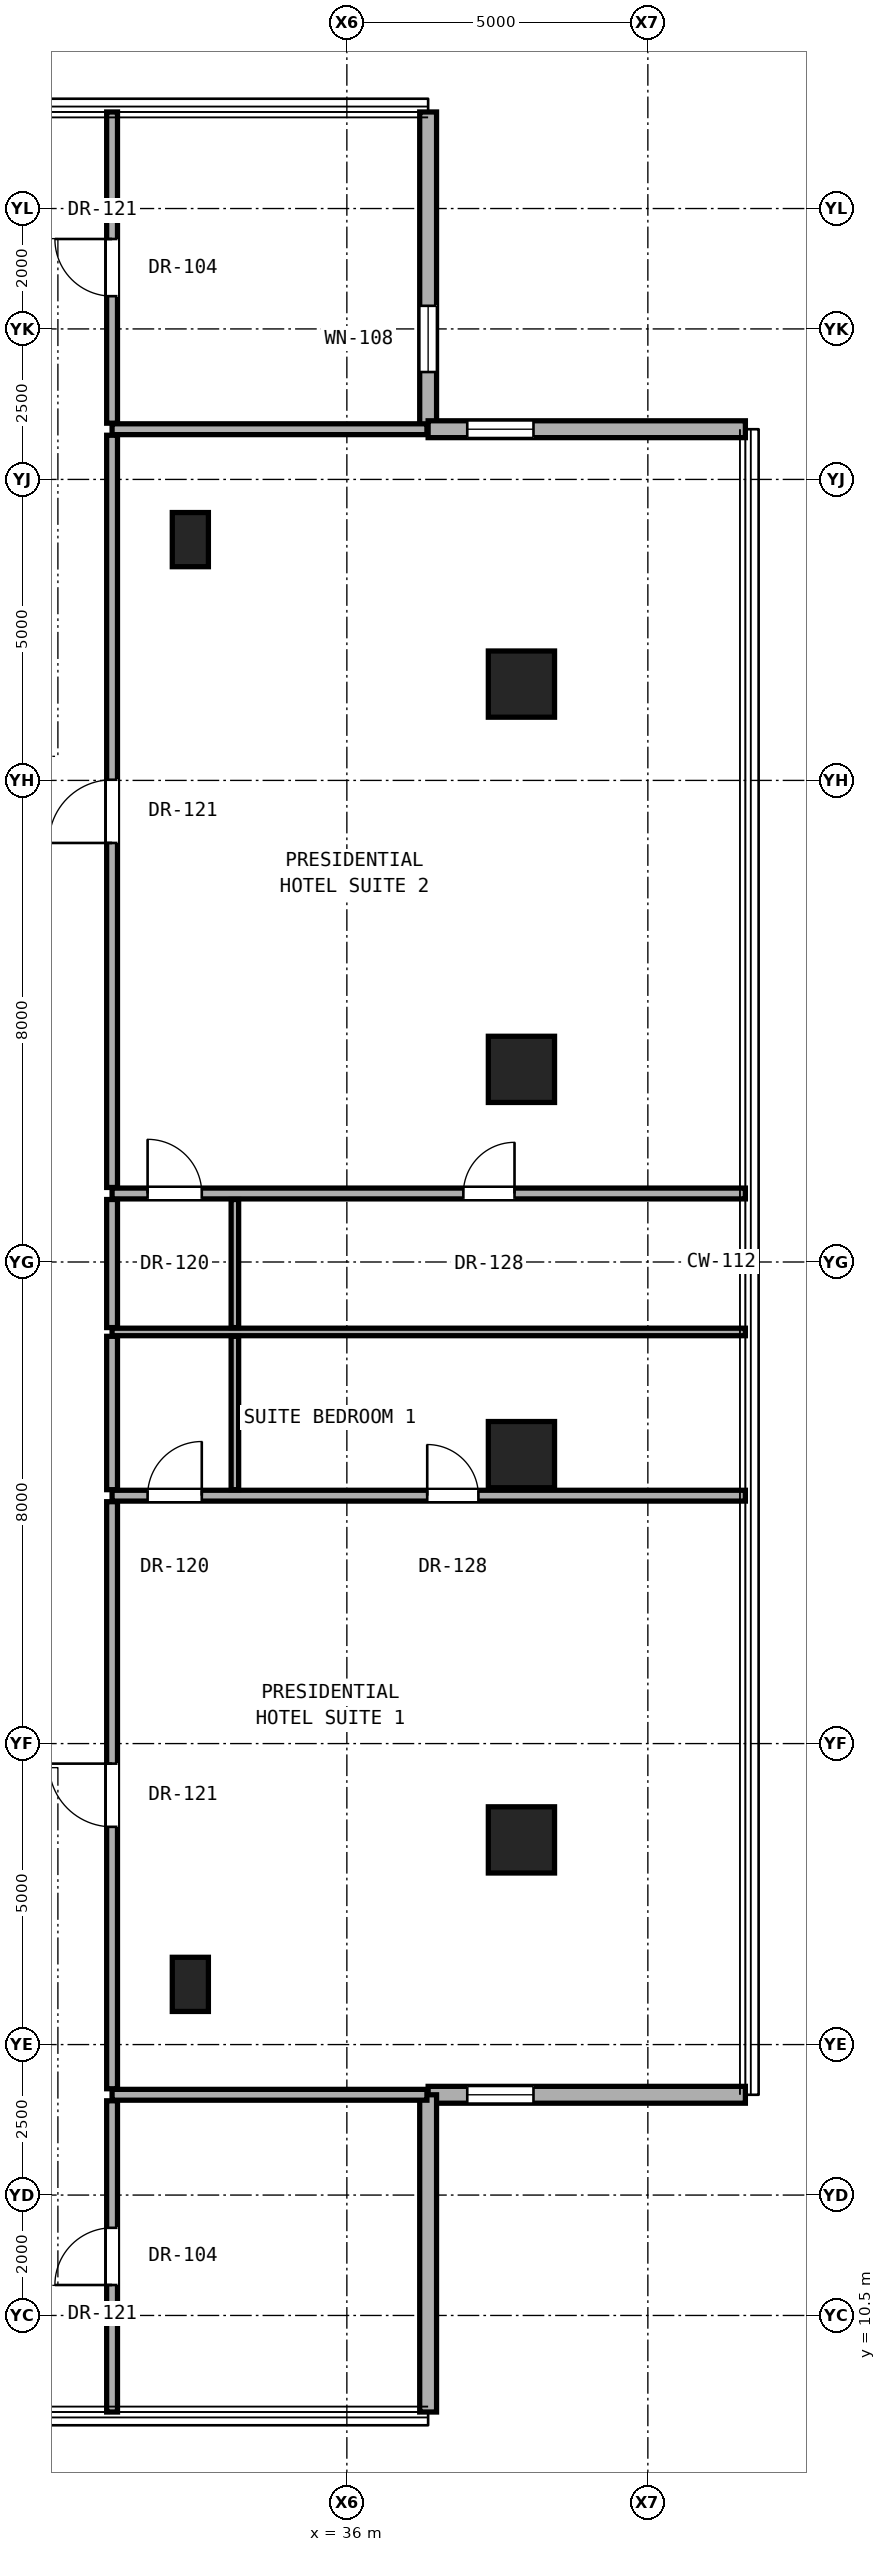
"""IFC4 building model, lengths in metres.
Left out: names, types, materials, properties, quantities, classifications, styles, units other than length and angle.
Written with IfcOpenShell. Run it as: python <this file> out.ifc"""

import sys

from ifc_helpers import new_model, si_unit, direction, frame, frame_2d, origin, origin_2d, place, context, subcontext, project, spatial, rectangle, hollow_rectangle, extrude, element, fill, save


model = new_model("IFC4")
c1 = context("Model", 3, precision=1e-05, world=origin(), true_north=direction((0.0, 1.0)))
c2 = subcontext(c1, "Body", "Model", "MODEL_VIEW")
j1 = project(units=[si_unit("LENGTHUNIT", "METRE"), si_unit("PLANEANGLEUNIT", "RADIAN")], contexts=[c1])
p1 = place(None, origin())
s1 = spatial("IfcSite", under=j1, at=p1, CompositionType="ELEMENT")
p2 = place(p1, origin())
s2 = spatial("IfcBuilding", under=s1, at=p2, CompositionType="ELEMENT")
p3 = place(p2, frame((0.0, 0.0, 144.5)))
s3 = spatial("IfcBuildingStorey", under=s2, at=p3, CompositionType="ELEMENT", Elevation=144.5)
for number, where, z_axis, x_axis in (
    (1, (38.9, 18.4, 0.0), (0.0, 0.0, 1.0), (1.0, 0.0, 0.0)),
    (2, (38.9, 24.8, 0.0), (0.0, 0.0, 1.0), (1.0, 0.0, 0.0)),
    (3, (38.9, 31.2, 0.0), (0.0, 0.0, 1.0), (1.0, 0.0, 0.0)),
    (4, (38.9, 37.6, 0.0), (0.0, 0.0, 1.0), (1.0, 0.0, 0.0)),
):
    element("IfcColumn", number, at=place(p3, frame(where, z_axis=z_axis, x_axis=x_axis)), inside=s3, PredefinedType="COLUMN", context=c2, shape_type="SweptSolid", body=[
        extrude(hollow_rectangle(XDim=1.1, YDim=1.1, WallThickness=0.06, at=origin_2d()), origin(), (0.0, 0.0, 1.0), 3.3),
    ])
for number, where, z_axis, x_axis in (
    (5, (33.4, 16.0, 0.0), (0.0, 0.0, 1.0), (1.0, 0.0, 0.0)),
    (6, (33.4, 40.0, 0.0), (0.0, 0.0, 1.0), (1.0, 0.0, 0.0)),
):
    element("IfcColumn", number, at=place(p3, frame(where, z_axis=z_axis, x_axis=x_axis)), inside=s3, PredefinedType="PILASTER", context=c2, shape_type="SweptSolid", body=[
        extrude(rectangle(XDim=0.6, YDim=0.9, at=origin_2d()), origin(), (0.0, 0.0, 1.0), 3.3),
    ])
p4 = place(p3, frame((37.35, 41.834, 0.0), z_axis=(0.0, 0.0, 1.0), x_axis=(0.0, 1.0, 0.0)))
e7 = element("IfcWall", 7, at=p4, inside=s3, PredefinedType="SOLIDWALL", context=c2, shape_type="SweptSolid", body=[
    extrude(rectangle(XDim=5.27, YDim=0.28, at=frame_2d((2.635, 0.0))), origin(), (0.0, 0.0, 1.0), 2.56),
])
p5 = place(p4, frame((0.95, 0.0, 0.41)))
e8 = element("IfcOpeningElement", 8, at=p5, cuts=e7, PredefinedType="OPENING", context=c2, shape_type="SweptSolid", body=[
    extrude(rectangle(XDim=1.1, YDim=2.0, at=frame_2d((0.55, 1.0))), frame((0.0, 0.15, 0.0), z_axis=(0.0, -1.0, 0.0), x_axis=(1.0, 0.0, 0.0)), (0.0, 0.0, 1.0), 0.3),
])
p6 = place(p3, frame((37.35, 14.166, 0.0), z_axis=(0.0, 0.0, 1.0), x_axis=(1.0, 0.0, 0.0)))
e9 = element("IfcWall", 9, at=p6, inside=s3, PredefinedType="SOLIDWALL", context=c2, shape_type="SweptSolid", body=[
    extrude(rectangle(XDim=5.27, YDim=0.28, at=frame_2d((2.635, 0.0))), origin(), (0.0, 0.0, 1.0), 2.56),
])
p7 = place(p6, frame((0.65, 0.0, 0.41)))
e10 = element("IfcOpeningElement", 10, at=p7, cuts=e9, PredefinedType="OPENING", context=c2, shape_type="SweptSolid", body=[
    extrude(rectangle(XDim=1.1, YDim=2.0, at=frame_2d((0.55, 1.0))), frame((0.0, 0.15, 0.0), z_axis=(0.0, -1.0, 0.0), x_axis=(1.0, 0.0, 0.0)), (0.0, 0.0, 1.0), 0.3),
])
p8 = place(p3, frame((37.35, 8.896, 0.0), z_axis=(0.0, 0.0, 1.0), x_axis=(0.0, 1.0, 0.0)))
e11 = element("IfcWall", 11, at=p8, inside=s3, PredefinedType="SOLIDWALL", context=c2, shape_type="SweptSolid", body=[
    extrude(rectangle(XDim=5.27, YDim=0.28, at=frame_2d((2.635, 0.0))), origin(), (0.0, 0.0, 1.0), 2.56),
])
p9 = place(p3, frame((42.62, 41.834, 0.0), z_axis=(0.0, 0.0, 1.0), x_axis=(-1.0, 0.0, 0.0)))
e12 = element("IfcWall", 12, at=p9, inside=s3, PredefinedType="SOLIDWALL", context=c2, shape_type="SweptSolid", body=[
    extrude(rectangle(XDim=5.27, YDim=0.28, at=frame_2d((2.635, 0.0))), origin(), (0.0, 0.0, 1.0), 2.56),
])
p10 = place(p9, frame((3.52, 0.0, 0.41)))
e13 = element("IfcOpeningElement", 13, at=p10, cuts=e12, PredefinedType="OPENING", context=c2, shape_type="SweptSolid", body=[
    extrude(rectangle(XDim=1.1, YDim=2.0, at=frame_2d((0.55, 1.0))), frame((0.0, 0.15, 0.0), z_axis=(0.0, -1.0, 0.0), x_axis=(1.0, 0.0, 0.0)), (0.0, 0.0, 1.0), 0.3),
])
p11 = place(p3, frame((32.1, 14.166, 0.0), z_axis=(0.0, 0.0, 1.0), x_axis=(1.0, 0.0, 0.0)))
e14 = element("IfcWall", 14, at=p11, inside=s3, PredefinedType="PARTITIONING", context=c2, shape_type="SweptSolid", body=[
    extrude(rectangle(XDim=5.23, YDim=0.18, at=frame_2d((2.615, 0.0))), origin(), (0.0, 0.0, 1.0), 2.94),
])
p12 = place(p3, frame((32.1, 24.118, 0.0), z_axis=(0.0, 0.0, 1.0), x_axis=(1.0, 0.0, 0.0)))
e15 = element("IfcWall", 15, at=p12, inside=s3, PredefinedType="PARTITIONING", context=c2, shape_type="SweptSolid", body=[
    extrude(rectangle(XDim=10.52, YDim=0.18, at=frame_2d((5.26, 0.0))), origin(), (0.0, 0.0, 1.0), 2.159),
])
p13 = place(p12, frame((5.235, 0.0, 0.0)))
e16 = element("IfcOpeningElement", 16, at=p13, cuts=e15, PredefinedType="OPENING", context=c2, shape_type="SweptSolid", body=[
    extrude(rectangle(XDim=0.85, YDim=2.01, at=frame_2d((0.425, 1.005))), frame((0.0, 0.1, 0.0), z_axis=(0.0, -1.0, 0.0), x_axis=(1.0, 0.0, 0.0)), (0.0, 0.0, 1.0), 0.2),
])
p14 = place(p12, frame((0.59, 0.0, 0.0)))
e17 = element("IfcOpeningElement", 17, at=p14, cuts=e15, PredefinedType="OPENING", context=c2, shape_type="SweptSolid", body=[
    extrude(rectangle(XDim=0.9, YDim=2.1, at=frame_2d((0.45, 1.05))), frame((0.0, 0.1, 0.0), z_axis=(0.0, -1.0, 0.0), x_axis=(1.0, 0.0, 0.0)), (0.0, 0.0, 1.0), 0.2),
])
p15 = place(p3, frame((32.1, 26.838, 0.0), z_axis=(0.0, 0.0, 1.0), x_axis=(1.0, 0.0, 0.0)))
e18 = element("IfcWall", 18, at=p15, inside=s3, PredefinedType="PARTITIONING", context=c2, shape_type="SweptSolid", body=[
    extrude(rectangle(XDim=10.52, YDim=0.125, at=frame_2d((5.26, 0.0))), origin(), (0.0, 0.0, 1.0), 2.159),
])
p16 = place(p3, frame((32.1, 29.138, 0.0), z_axis=(0.0, 0.0, 1.0), x_axis=(1.0, 0.0, 0.0)))
e19 = element("IfcWall", 19, at=p16, inside=s3, PredefinedType="PARTITIONING", context=c2, shape_type="SweptSolid", body=[
    extrude(rectangle(XDim=10.52, YDim=0.18, at=frame_2d((5.26, 0.0))), origin(), (0.0, 0.0, 1.0), 2.159),
])
p17 = place(p16, frame((5.835, 0.0, 0.0)))
e20 = element("IfcOpeningElement", 20, at=p17, cuts=e19, PredefinedType="OPENING", context=c2, shape_type="SweptSolid", body=[
    extrude(rectangle(XDim=0.85, YDim=2.01, at=frame_2d((0.425, 1.005))), frame((0.0, 0.1, 0.0), z_axis=(0.0, -1.0, 0.0), x_axis=(1.0, 0.0, 0.0)), (0.0, 0.0, 1.0), 0.2),
])
p18 = place(p16, frame((0.59, 0.0, 0.0)))
e21 = element("IfcOpeningElement", 21, at=p18, cuts=e19, PredefinedType="OPENING", context=c2, shape_type="SweptSolid", body=[
    extrude(rectangle(XDim=0.9, YDim=2.1, at=frame_2d((0.45, 1.05))), frame((0.0, 0.1, 0.0), z_axis=(0.0, -1.0, 0.0), x_axis=(1.0, 0.0, 0.0)), (0.0, 0.0, 1.0), 0.2),
])
p19 = place(p3, frame((32.1, 41.834, 0.0), z_axis=(0.0, 0.0, 1.0), x_axis=(1.0, 0.0, 0.0)))
e22 = element("IfcWall", 22, at=p19, inside=s3, PredefinedType="PARTITIONING", context=c2, shape_type="SweptSolid", body=[
    extrude(rectangle(XDim=5.23, YDim=0.18, at=frame_2d((2.615, 0.0))), origin(), (0.0, 0.0, 1.0), 2.94),
])
p20 = place(p3, frame((32.1, 8.896, 0.0), z_axis=(0.0, 0.0, 1.0), x_axis=(0.0, 1.0, 0.0)))
e23 = element("IfcWall", 23, at=p20, inside=s3, PredefinedType="PARTITIONING", context=c2, shape_type="SweptSolid", body=[
    extrude(rectangle(XDim=5.17, YDim=0.18, at=frame_2d((2.585, 0.0))), origin(), (0.0, 0.0, 1.0), 2.94),
])
p21 = place(p20, frame((2.11, 0.0, 0.0)))
e24 = element("IfcOpeningElement", 24, at=p21, cuts=e23, PredefinedType="OPENING", context=c2, shape_type="SweptSolid", body=[
    extrude(rectangle(XDim=0.95, YDim=2.15, at=frame_2d((0.475, 1.075))), frame((0.0, 0.1, 0.0), z_axis=(0.0, -1.0, 0.0), x_axis=(1.0, 0.0, 0.0)), (0.0, 0.0, 1.0), 0.2),
])
p22 = place(p3, frame((32.1, 14.266, 0.0), z_axis=(0.0, 0.0, 1.0), x_axis=(0.0, 1.0, 0.0)))
e25 = element("IfcWall", 25, at=p22, inside=s3, PredefinedType="PARTITIONING", context=c2, shape_type="SweptSolid", body=[
    extrude(rectangle(XDim=9.752, YDim=0.18, at=frame_2d((4.876, 0.0))), origin(), (0.0, 0.0, 1.0), 2.316),
])
p23 = place(p22, frame((4.351, 0.0, 0.0)))
e26 = element("IfcOpeningElement", 26, at=p23, cuts=e25, PredefinedType="OPENING", context=c2, shape_type="SweptSolid", body=[
    extrude(rectangle(XDim=1.05, YDim=2.2, at=frame_2d((0.525, 1.1))), frame((0.0, 0.1, 0.0), z_axis=(0.0, -1.0, 0.0), x_axis=(1.0, 0.0, 0.0)), (0.0, 0.0, 1.0), 0.2),
])
p24 = place(p3, frame((32.1, 24.218, 0.0), z_axis=(0.0, 0.0, 1.0), x_axis=(0.0, 1.0, 0.0)))
e27 = element("IfcWall", 27, at=p24, inside=s3, PredefinedType="PARTITIONING", context=c2, shape_type="SweptSolid", body=[
    extrude(rectangle(XDim=2.547, YDim=0.18, at=frame_2d((1.274, 0.0))), origin(), (0.0, 0.0, 1.0), 2.316),
])
p25 = place(p3, frame((32.1, 26.91, 0.0), z_axis=(0.0, 0.0, 1.0), x_axis=(0.0, 1.0, 0.0)))
e28 = element("IfcWall", 28, at=p25, inside=s3, PredefinedType="PARTITIONING", context=c2, shape_type="SweptSolid", body=[
    extrude(rectangle(XDim=2.128, YDim=0.18, at=frame_2d((1.064, 0.0))), origin(), (0.0, 0.0, 1.0), 2.94),
])
p26 = place(p3, frame((32.1, 29.238, 0.0), z_axis=(0.0, 0.0, 1.0), x_axis=(0.0, 1.0, 0.0)))
e29 = element("IfcWall", 29, at=p26, inside=s3, PredefinedType="PARTITIONING", context=c2, shape_type="SweptSolid", body=[
    extrude(rectangle(XDim=12.496, YDim=0.18, at=frame_2d((6.248, 0.0))), origin(), (0.0, 0.0, 1.0), 2.316),
])
p27 = place(p26, frame((5.723, 0.0, 0.0)))
e30 = element("IfcOpeningElement", 30, at=p27, cuts=e29, PredefinedType="OPENING", context=c2, shape_type="SweptSolid", body=[
    extrude(rectangle(XDim=1.05, YDim=2.2, at=frame_2d((0.525, 1.1))), frame((0.0, 0.1, 0.0), z_axis=(0.0, -1.0, 0.0), x_axis=(1.0, 0.0, 0.0)), (0.0, 0.0, 1.0), 0.2),
])
p28 = place(p3, frame((32.1, 41.934, 0.0), z_axis=(0.0, 0.0, 1.0), x_axis=(0.0, 1.0, 0.0)))
e31 = element("IfcWall", 31, at=p28, inside=s3, PredefinedType="PARTITIONING", context=c2, shape_type="SweptSolid", body=[
    extrude(rectangle(XDim=5.17, YDim=0.18, at=frame_2d((2.585, 0.0))), origin(), (0.0, 0.0, 1.0), 2.94),
])
p29 = place(p28, frame((2.11, 0.0, 0.0)))
e32 = element("IfcOpeningElement", 32, at=p29, cuts=e31, PredefinedType="OPENING", context=c2, shape_type="SweptSolid", body=[
    extrude(rectangle(XDim=0.95, YDim=2.15, at=frame_2d((0.475, 1.075))), frame((0.0, 0.1, 0.0), z_axis=(0.0, -1.0, 0.0), x_axis=(1.0, 0.0, 0.0)), (0.0, 0.0, 1.0), 0.2),
])
p30 = place(p3, frame((34.14, 24.218, 0.0), z_axis=(0.0, 0.0, 1.0), x_axis=(0.0, 1.0, 0.0)))
e33 = element("IfcWall", 33, at=p30, inside=s3, PredefinedType="PARTITIONING", context=c2, shape_type="SweptSolid", body=[
    extrude(rectangle(XDim=2.547, YDim=0.125, at=frame_2d((1.274, 0.0))), origin(), (0.0, 0.0, 1.0), 2.316),
])
p31 = place(p3, frame((34.14, 26.91, 0.0), z_axis=(0.0, 0.0, 1.0), x_axis=(0.0, 1.0, 0.0)))
e34 = element("IfcWall", 34, at=p31, inside=s3, PredefinedType="PARTITIONING", context=c2, shape_type="SweptSolid", body=[
    extrude(rectangle(XDim=2.128, YDim=0.125, at=frame_2d((1.064, 0.0))), origin(), (0.0, 0.0, 1.0), 2.94),
])
p32 = place(p5, origin())
e35 = element("IfcWindow", 35, at=p32, inside=s3, PartitioningType="SINGLE_PANEL", PredefinedType="WINDOW", context=c2, shape_type="SweptSolid", body=[
    extrude(rectangle(XDim=1.1, YDim=2.0, at=frame_2d((0.55, 1.0))), frame((0.0, 0.03, 0.0), z_axis=(0.0, -1.0, 0.0), x_axis=(1.0, 0.0, 0.0)), (0.0, 0.0, 1.0), 0.06),
])
fill(e8, e35)
p33 = place(p7, origin())
e36 = element("IfcWindow", 36, at=p33, inside=s3, PartitioningType="SINGLE_PANEL", PredefinedType="WINDOW", context=c2, shape_type="SweptSolid", body=[
    extrude(rectangle(XDim=1.1, YDim=2.0, at=frame_2d((0.55, 1.0))), frame((0.0, 0.03, 0.0), z_axis=(0.0, -1.0, 0.0), x_axis=(1.0, 0.0, 0.0)), (0.0, 0.0, 1.0), 0.06),
])
fill(e10, e36)
p34 = place(p10, origin())
e37 = element("IfcWindow", 37, at=p34, inside=s3, PartitioningType="SINGLE_PANEL", PredefinedType="WINDOW", context=c2, shape_type="SweptSolid", body=[
    extrude(rectangle(XDim=1.1, YDim=2.0, at=frame_2d((0.55, 1.0))), frame((0.0, 0.03, 0.0), z_axis=(0.0, -1.0, 0.0), x_axis=(1.0, 0.0, 0.0)), (0.0, 0.0, 1.0), 0.06),
])
fill(e13, e37)
p35 = place(p23, origin())
e38 = element("IfcDoor", 38, at=p35, inside=s3, OperationType="SINGLE_SWING_RIGHT", PredefinedType="DOOR", context=c2, shape_type="SweptSolid", body=[
    extrude(rectangle(XDim=1.05, YDim=2.2, at=frame_2d((0.525, 1.1))), frame((0.0, 0.025, 0.0), z_axis=(0.0, -1.0, 0.0), x_axis=(1.0, 0.0, 0.0)), (0.0, 0.0, 1.0), 0.05),
])
fill(e26, e38)
p36 = place(p13, origin())
e39 = element("IfcDoor", 39, at=p36, inside=s3, OperationType="SINGLE_SWING_LEFT", PredefinedType="DOOR", context=c2, shape_type="SweptSolid", body=[
    extrude(rectangle(XDim=0.85, YDim=2.01, at=frame_2d((0.425, 1.005))), frame((0.0, 0.025, 0.0), z_axis=(0.0, -1.0, 0.0), x_axis=(1.0, 0.0, 0.0)), (0.0, 0.0, 1.0), 0.05),
])
fill(e16, e39)
p37 = place(p14, origin())
e40 = element("IfcDoor", 40, at=p37, inside=s3, OperationType="SINGLE_SWING_RIGHT", PredefinedType="DOOR", context=c2, shape_type="SweptSolid", body=[
    extrude(rectangle(XDim=0.9, YDim=2.1, at=frame_2d((0.45, 1.05))), frame((0.0, 0.025, 0.0), z_axis=(0.0, -1.0, 0.0), x_axis=(1.0, 0.0, 0.0)), (0.0, 0.0, 1.0), 0.05),
])
fill(e17, e40)
p38 = place(p27, origin())
e41 = element("IfcDoor", 41, at=p38, inside=s3, OperationType="SINGLE_SWING_LEFT", PredefinedType="DOOR", context=c2, shape_type="SweptSolid", body=[
    extrude(rectangle(XDim=1.05, YDim=2.2, at=frame_2d((0.525, 1.1))), frame((0.0, 0.025, 0.0), z_axis=(0.0, -1.0, 0.0), x_axis=(1.0, 0.0, 0.0)), (0.0, 0.0, 1.0), 0.05),
])
fill(e30, e41)
p39 = place(p17, origin())
e42 = element("IfcDoor", 42, at=p39, inside=s3, OperationType="SINGLE_SWING_RIGHT", PredefinedType="DOOR", context=c2, shape_type="SweptSolid", body=[
    extrude(rectangle(XDim=0.85, YDim=2.01, at=frame_2d((0.425, 1.005))), frame((0.0, 0.025, 0.0), z_axis=(0.0, -1.0, 0.0), x_axis=(1.0, 0.0, 0.0)), (0.0, 0.0, 1.0), 0.05),
])
fill(e20, e42)
p40 = place(p18, origin())
e43 = element("IfcDoor", 43, at=p40, inside=s3, OperationType="SINGLE_SWING_LEFT", PredefinedType="DOOR", context=c2, shape_type="SweptSolid", body=[
    extrude(rectangle(XDim=0.9, YDim=2.1, at=frame_2d((0.45, 1.05))), frame((0.0, 0.025, 0.0), z_axis=(0.0, -1.0, 0.0), x_axis=(1.0, 0.0, 0.0)), (0.0, 0.0, 1.0), 0.05),
])
fill(e21, e43)
p41 = place(p21, origin())
e44 = element("IfcDoor", 44, at=p41, inside=s3, OperationType="SINGLE_SWING_LEFT", PredefinedType="DOOR", context=c2, shape_type="SweptSolid", body=[
    extrude(rectangle(XDim=0.95, YDim=2.15, at=frame_2d((0.475, 1.075))), frame((0.0, 0.025, 0.0), z_axis=(0.0, -1.0, 0.0), x_axis=(1.0, 0.0, 0.0)), (0.0, 0.0, 1.0), 0.05),
])
fill(e24, e44)
p42 = place(p29, origin())
e45 = element("IfcDoor", 45, at=p42, inside=s3, OperationType="SINGLE_SWING_RIGHT", PredefinedType="DOOR", context=c2, shape_type="SweptSolid", body=[
    extrude(rectangle(XDim=0.95, YDim=2.15, at=frame_2d((0.475, 1.075))), frame((0.0, 0.025, 0.0), z_axis=(0.0, -1.0, 0.0), x_axis=(1.0, 0.0, 0.0)), (0.0, 0.0, 1.0), 0.05),
])
fill(e32, e45)
save(model, sys.argv[1])
